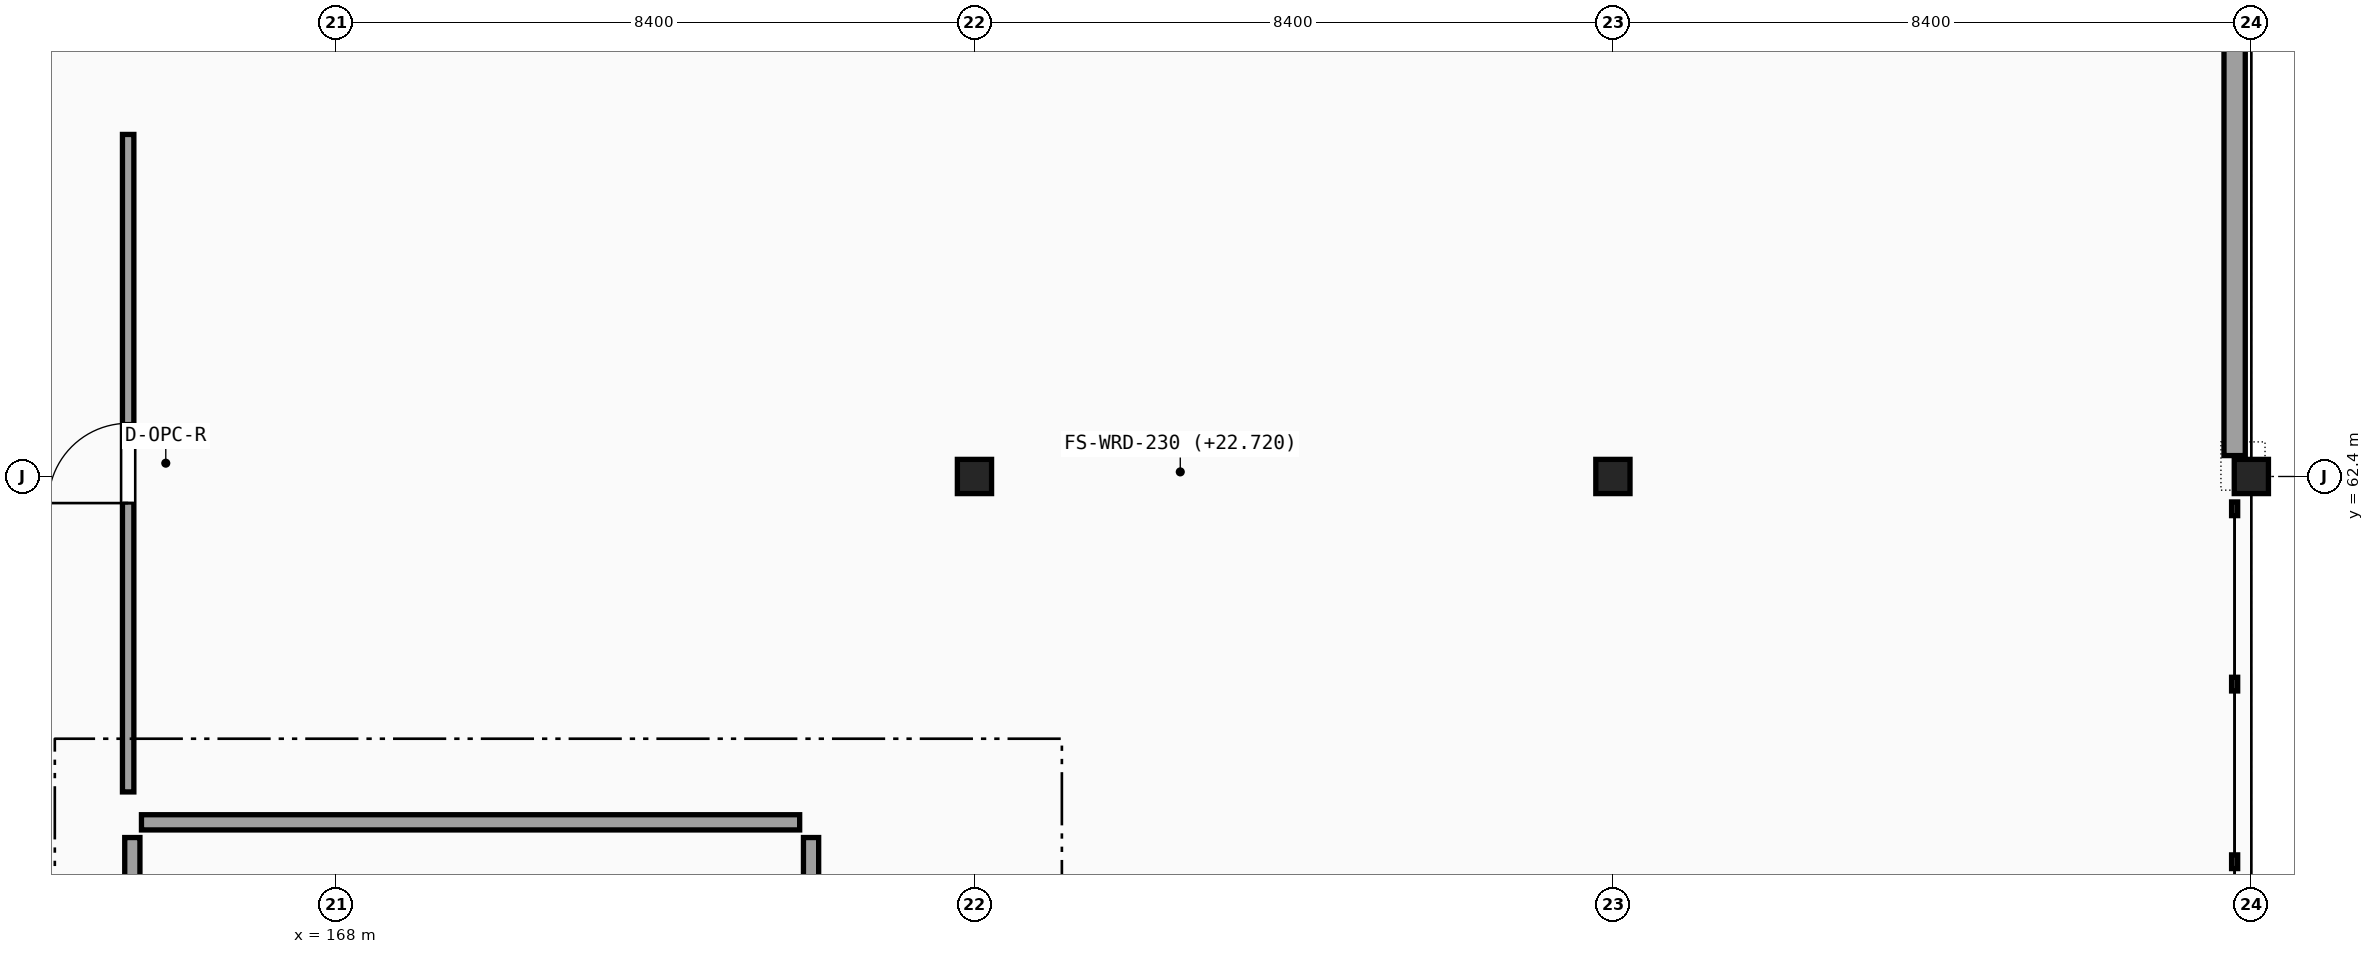
"""IFC4 building model, lengths in metres.
Left out: names, types, materials, properties, quantities, classifications, styles, units other than length and angle.
Written with IfcOpenShell. Run it as: python <this file> out.ifc"""

import sys

from ifc_helpers import new_model, si_unit, direction, frame, frame_2d, origin, origin_2d, place, context, subcontext, project, spatial, rectangle, i_section, extrude, element, fill, save


model = new_model("IFC4")
c1 = context("Model", 3, precision=1e-05, world=origin(), true_north=direction((0.0, 1.0)))
c2 = subcontext(c1, "Body", "Model", "MODEL_VIEW")
j1 = project(units=[si_unit("LENGTHUNIT", "METRE"), si_unit("PLANEANGLEUNIT", "RADIAN")], contexts=[c1])
p1 = place(None, origin())
s1 = spatial("IfcSite", under=j1, at=p1, CompositionType="ELEMENT")
p2 = place(p1, origin())
s2 = spatial("IfcBuilding", under=s1, at=p2, CompositionType="ELEMENT")
p3 = place(p2, frame((0.0, 0.0, 22.95)))
s3 = spatial("IfcBuildingStorey", under=s2, at=p3, CompositionType="ELEMENT", Elevation=22.95)
for number, where, z_axis, x_axis in (
    (1, (176.4, 62.4, 0.0), (0.0, 0.0, 1.0), (1.0, 0.0, 0.0)),
    (2, (184.8, 62.4, 0.0), (0.0, 0.0, 1.0), (1.0, 0.0, 0.0)),
    (3, (193.2, 62.4, 0.0), (0.0, 0.0, 1.0), (1.0, 0.0, 0.0)),
):
    element("IfcColumn", number, at=place(p3, frame(where, z_axis=z_axis, x_axis=x_axis)), inside=s3, PredefinedType="COLUMN", context=c2, shape_type="SweptSolid", body=[
        extrude(i_section(OverallWidth=0.3, OverallDepth=0.45, WebThickness=0.014, FlangeThickness=0.026, FilletRadius=0.027, at=origin_2d()), origin(), (0.0, 0.0, 1.0), 4.05),
    ])
p4 = place(p3, frame((192.98, 62.675, 0.0), z_axis=(0.0, 0.0, 1.0), x_axis=(0.0, 1.0, 0.0)))
e4 = element("IfcWall", 4, at=p4, inside=s3, PredefinedType="SOLIDWALL", context=c2, shape_type="SweptSolid", body=[
    extrude(rectangle(XDim=7.25, YDim=0.28, at=frame_2d((3.625, 0.0))), origin(), (0.0, 0.0, 1.0), 3.25),
])
p5 = place(p3, frame((165.44, 57.85, 0.0), z_axis=(0.0, 0.0, 1.0), x_axis=(1.0, 0.0, 0.0)))
e5 = element("IfcWall", 5, at=p5, inside=s3, PredefinedType="PARTITIONING", context=c2, shape_type="SweptSolid", body=[
    extrude(rectangle(XDim=8.66, YDim=0.2, at=frame_2d((4.33, 0.0))), origin(), (0.0, 0.0, 1.0), 3.25),
])
p6 = place(p3, frame((165.32, 55.0, 0.0), z_axis=(0.0, 0.0, 1.0), x_axis=(0.0, 1.0, 0.0)))
e6 = element("IfcWall", 6, at=p6, inside=s3, PredefinedType="PARTITIONING", context=c2, shape_type="SweptSolid", body=[
    extrude(rectangle(XDim=2.65, YDim=0.2, at=frame_2d((1.325, 0.0))), origin(), (0.0, 0.0, 1.0), 3.25),
])
p7 = place(p6, frame((0.525, 0.0, 0.0)))
e7 = element("IfcOpeningElement", 7, at=p7, cuts=e6, PredefinedType="OPENING", context=c2, shape_type="SweptSolid", body=[
    extrude(rectangle(XDim=1.6, YDim=2.2, at=frame_2d((0.8, 1.1))), frame((0.0, 0.11, 0.0), z_axis=(0.0, -1.0, 0.0), x_axis=(1.0, 0.0, 0.0)), (0.0, 0.0, 1.0), 0.22),
])
p8 = place(p3, frame((174.25, 55.0, 0.0), z_axis=(0.0, 0.0, 1.0), x_axis=(0.0, 1.0, 0.0)))
e8 = element("IfcWall", 8, at=p8, inside=s3, PredefinedType="PARTITIONING", context=c2, shape_type="SweptSolid", body=[
    extrude(rectangle(XDim=2.65, YDim=0.2, at=frame_2d((1.325, 0.0))), origin(), (0.0, 0.0, 1.0), 3.25),
])
p9 = place(p8, frame((0.525, 0.0, 0.0)))
e9 = element("IfcOpeningElement", 9, at=p9, cuts=e8, PredefinedType="OPENING", context=c2, shape_type="SweptSolid", body=[
    extrude(rectangle(XDim=1.6, YDim=2.2, at=frame_2d((0.8, 1.1))), frame((0.0, 0.11, 0.0), z_axis=(0.0, -1.0, 0.0), x_axis=(1.0, 0.0, 0.0)), (0.0, 0.0, 1.0), 0.22),
])
p10 = place(p3, frame((165.265, 58.25, 0.0), z_axis=(0.0, 0.0, 1.0), x_axis=(0.0, 1.0, 0.0)))
e10 = element("IfcWall", 10, at=p10, inside=s3, PredefinedType="PARTITIONING", context=c2, shape_type="SweptSolid", body=[
    extrude(rectangle(XDim=8.65, YDim=0.15, at=frame_2d((4.325, 0.0))), origin(), (0.0, 0.0, 1.0), 3.25),
])
p11 = place(p10, frame((3.8, 0.0, 0.0)))
e11 = element("IfcOpeningElement", 11, at=p11, cuts=e10, PredefinedType="OPENING", context=c2, shape_type="SweptSolid", body=[
    extrude(rectangle(XDim=1.05, YDim=2.15, at=frame_2d((0.525, 1.075))), frame((0.0, 0.085, 0.0), z_axis=(0.0, -1.0, 0.0), x_axis=(1.0, 0.0, 0.0)), (0.0, 0.0, 1.0), 0.17),
])
p12 = place(p11, origin())
e12 = element("IfcDoor", 12, at=p12, inside=s3, OperationType="SINGLE_SWING_LEFT", PredefinedType="DOOR", context=c2, shape_type="SweptSolid", body=[
    extrude(rectangle(XDim=1.05, YDim=2.15, at=frame_2d((0.525, 1.075))), frame((0.0, 0.025, 0.0), z_axis=(0.0, -1.0, 0.0), x_axis=(1.0, 0.0, 0.0)), (0.0, 0.0, 1.0), 0.05),
])
fill(e11, e12)
save(model, sys.argv[1])
